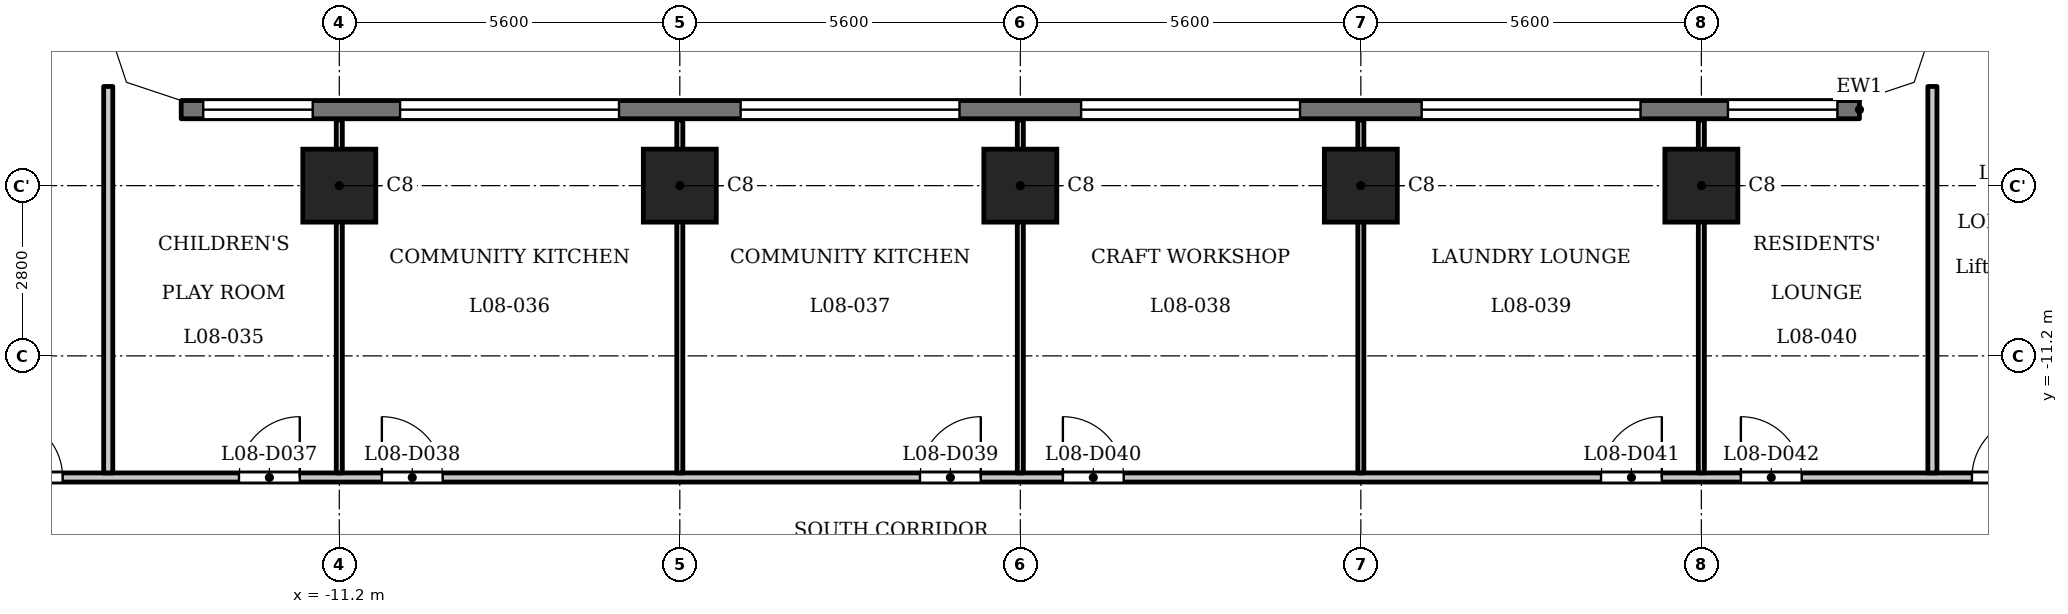
"""IFC4 building model, lengths in metres.
Left out: names, types, materials, properties, quantities, classifications, styles, units other than length and angle.
Written with IfcOpenShell. Run it as: python <this file> out.ifc"""

import sys

from ifc_helpers import new_model, si_unit, direction, frame, frame_2d, origin, origin_2d, place, context, subcontext, project, spatial, polyline, rectangle, outline, extrude, element, fill, save


model = new_model("IFC4")
c1 = context("Model", 3, precision=1e-05, world=origin(), true_north=direction((0.0, 1.0)))
c2 = subcontext(c1, "Body", "Model", "MODEL_VIEW")
j1 = project(units=[si_unit("LENGTHUNIT", "METRE"), si_unit("PLANEANGLEUNIT", "RADIAN")], contexts=[c1])
p1 = place(None, origin())
s1 = spatial("IfcSite", under=j1, at=p1, CompositionType="ELEMENT")
p2 = place(p1, origin())
s2 = spatial("IfcBuilding", under=s1, at=p2, CompositionType="ELEMENT")
p3 = place(p2, frame((0.0, 0.0, 37.5)))
s3 = spatial("IfcBuildingStorey", under=s2, at=p3, CompositionType="ELEMENT", Elevation=37.5)
for number, where, z_axis, x_axis in (
    (1, (-11.2, -8.4, 0.0), (0.0, 0.0, 1.0), (1.0, 0.0, 0.0)),
    (2, (-5.6, -8.4, 0.0), (0.0, 0.0, 1.0), (1.0, 0.0, 0.0)),
    (3, (0.0, -8.4, 0.0), (0.0, 0.0, 1.0), (1.0, 0.0, 0.0)),
    (4, (5.6, -8.4, 0.0), (0.0, 0.0, 1.0), (1.0, 0.0, 0.0)),
    (5, (11.2, -8.4, 0.0), (0.0, 0.0, 1.0), (1.0, 0.0, 0.0)),
):
    element("IfcColumn", number, at=place(p3, frame(where, z_axis=z_axis, x_axis=x_axis)), inside=s3, PredefinedType="COLUMN", context=c2, shape_type="SweptSolid", body=[
        extrude(rectangle(XDim=1.2, YDim=1.2, at=origin_2d()), origin(), (0.0, 0.0, 1.0), 3.5),
    ])
p4 = place(p3, frame((13.8, -7.15, 0.0), z_axis=(0.0, 0.0, 1.0), x_axis=(-1.0, 0.0, 0.0)))
e6 = element("IfcWall", 6, at=p4, inside=s3, PredefinedType="SOLIDWALL", context=c2, shape_type="SweptSolid", body=[
    extrude(rectangle(XDim=27.6, YDim=0.3, at=frame_2d((13.8, 0.0))), origin(), (0.0, 0.0, 1.0), 3.2),
])
p5 = place(p4, frame((0.363, 0.0, 0.9)))
e7 = element("IfcOpeningElement", 7, at=p5, cuts=e6, PredefinedType="OPENING", context=c2, shape_type="SweptSolid", body=[
    extrude(rectangle(XDim=1.8, YDim=1.25, at=frame_2d((0.9, 0.625))), frame((0.0, 0.16, 0.0), z_axis=(0.0, -1.0, 0.0), x_axis=(1.0, 0.0, 0.0)), (0.0, 0.0, 1.0), 0.32),
])
p6 = place(p4, frame((3.6, 0.0, 1.2)))
e8 = element("IfcOpeningElement", 8, at=p6, cuts=e6, PredefinedType="OPENING", context=c2, shape_type="SweptSolid", body=[
    extrude(rectangle(XDim=3.6, YDim=0.95, at=frame_2d((1.8, 0.475))), frame((0.0, 0.16, 0.0), z_axis=(0.0, -1.0, 0.0), x_axis=(1.0, 0.0, 0.0)), (0.0, 0.0, 1.0), 0.32),
])
p7 = place(p4, frame((9.2, 0.0, 1.2)))
e9 = element("IfcOpeningElement", 9, at=p7, cuts=e6, PredefinedType="OPENING", context=c2, shape_type="SweptSolid", body=[
    extrude(rectangle(XDim=3.6, YDim=0.95, at=frame_2d((1.8, 0.475))), frame((0.0, 0.16, 0.0), z_axis=(0.0, -1.0, 0.0), x_axis=(1.0, 0.0, 0.0)), (0.0, 0.0, 1.0), 0.32),
])
p8 = place(p4, frame((14.8, 0.0, 1.2)))
e10 = element("IfcOpeningElement", 10, at=p8, cuts=e6, PredefinedType="OPENING", context=c2, shape_type="SweptSolid", body=[
    extrude(rectangle(XDim=3.6, YDim=0.95, at=frame_2d((1.8, 0.475))), frame((0.0, 0.16, 0.0), z_axis=(0.0, -1.0, 0.0), x_axis=(1.0, 0.0, 0.0)), (0.0, 0.0, 1.0), 0.32),
])
p9 = place(p4, frame((20.4, 0.0, 1.2)))
e11 = element("IfcOpeningElement", 11, at=p9, cuts=e6, PredefinedType="OPENING", context=c2, shape_type="SweptSolid", body=[
    extrude(rectangle(XDim=3.6, YDim=0.95, at=frame_2d((1.8, 0.475))), frame((0.0, 0.16, 0.0), z_axis=(0.0, -1.0, 0.0), x_axis=(1.0, 0.0, 0.0)), (0.0, 0.0, 1.0), 0.32),
])
p10 = place(p4, frame((25.438, 0.0, 0.9)))
e12 = element("IfcOpeningElement", 12, at=p10, cuts=e6, PredefinedType="OPENING", context=c2, shape_type="SweptSolid", body=[
    extrude(rectangle(XDim=1.8, YDim=1.25, at=frame_2d((0.9, 0.625))), frame((0.0, 0.16, 0.0), z_axis=(0.0, -1.0, 0.0), x_axis=(1.0, 0.0, 0.0)), (0.0, 0.0, 1.0), 0.32),
])
p11 = place(p3, frame((-17.4, -13.2, 0.0), z_axis=(0.0, 0.0, 1.0), x_axis=(1.0, 0.0, 0.0)))
e13 = element("IfcWall", 13, at=p11, inside=s3, PredefinedType="PARTITIONING", context=c2, shape_type="SweptSolid", body=[
    extrude(rectangle(XDim=34.8, YDim=0.15, at=frame_2d((17.4, 0.0))), origin(), (0.0, 0.0, 1.0), 3.2),
])
p12 = place(p11, frame((0.65, 0.0, 0.0)))
e14 = element("IfcOpeningElement", 14, at=p12, cuts=e13, PredefinedType="OPENING", context=c2, shape_type="SweptSolid", body=[
    extrude(rectangle(XDim=1.0, YDim=2.1, at=frame_2d((0.5, 1.05))), frame((0.0, 0.085, 0.0), z_axis=(0.0, -1.0, 0.0), x_axis=(1.0, 0.0, 0.0)), (0.0, 0.0, 1.0), 0.17),
])
p13 = place(p11, frame((33.05, 0.0, 0.0)))
e15 = element("IfcOpeningElement", 15, at=p13, cuts=e13, PredefinedType="OPENING", context=c2, shape_type="SweptSolid", body=[
    extrude(rectangle(XDim=1.0, YDim=2.1, at=frame_2d((0.5, 1.05))), frame((0.0, 0.085, 0.0), z_axis=(0.0, -1.0, 0.0), x_axis=(1.0, 0.0, 0.0)), (0.0, 0.0, 1.0), 0.17),
])
p14 = place(p11, frame((4.55, 0.0, 0.0)))
e16 = element("IfcOpeningElement", 16, at=p14, cuts=e13, PredefinedType="OPENING", context=c2, shape_type="SweptSolid", body=[
    extrude(rectangle(XDim=1.0, YDim=2.1, at=frame_2d((0.5, 1.05))), frame((0.0, 0.085, 0.0), z_axis=(0.0, -1.0, 0.0), x_axis=(1.0, 0.0, 0.0)), (0.0, 0.0, 1.0), 0.17),
])
p15 = place(p11, frame((6.9, 0.0, 0.0)))
e17 = element("IfcOpeningElement", 17, at=p15, cuts=e13, PredefinedType="OPENING", context=c2, shape_type="SweptSolid", body=[
    extrude(rectangle(XDim=1.0, YDim=2.1, at=frame_2d((0.5, 1.05))), frame((0.0, 0.085, 0.0), z_axis=(0.0, -1.0, 0.0), x_axis=(1.0, 0.0, 0.0)), (0.0, 0.0, 1.0), 0.17),
])
p16 = place(p11, frame((15.75, 0.0, 0.0)))
e18 = element("IfcOpeningElement", 18, at=p16, cuts=e13, PredefinedType="OPENING", context=c2, shape_type="SweptSolid", body=[
    extrude(rectangle(XDim=1.0, YDim=2.1, at=frame_2d((0.5, 1.05))), frame((0.0, 0.085, 0.0), z_axis=(0.0, -1.0, 0.0), x_axis=(1.0, 0.0, 0.0)), (0.0, 0.0, 1.0), 0.17),
])
p17 = place(p11, frame((18.1, 0.0, 0.0)))
e19 = element("IfcOpeningElement", 19, at=p17, cuts=e13, PredefinedType="OPENING", context=c2, shape_type="SweptSolid", body=[
    extrude(rectangle(XDim=1.0, YDim=2.1, at=frame_2d((0.5, 1.05))), frame((0.0, 0.085, 0.0), z_axis=(0.0, -1.0, 0.0), x_axis=(1.0, 0.0, 0.0)), (0.0, 0.0, 1.0), 0.17),
])
p18 = place(p11, frame((26.95, 0.0, 0.0)))
e20 = element("IfcOpeningElement", 20, at=p18, cuts=e13, PredefinedType="OPENING", context=c2, shape_type="SweptSolid", body=[
    extrude(rectangle(XDim=1.0, YDim=2.1, at=frame_2d((0.5, 1.05))), frame((0.0, 0.085, 0.0), z_axis=(0.0, -1.0, 0.0), x_axis=(1.0, 0.0, 0.0)), (0.0, 0.0, 1.0), 0.17),
])
p19 = place(p11, frame((29.25, 0.0, 0.0)))
e21 = element("IfcOpeningElement", 21, at=p19, cuts=e13, PredefinedType="OPENING", context=c2, shape_type="SweptSolid", body=[
    extrude(rectangle(XDim=1.0, YDim=2.1, at=frame_2d((0.5, 1.05))), frame((0.0, 0.085, 0.0), z_axis=(0.0, -1.0, 0.0), x_axis=(1.0, 0.0, 0.0)), (0.0, 0.0, 1.0), 0.17),
])
p20 = place(p3, frame((-15.0, -13.125, 0.0), z_axis=(0.0, 0.0, 1.0), x_axis=(0.0, 1.0, 0.0)))
e22 = element("IfcWall", 22, at=p20, inside=s3, PredefinedType="PARTITIONING", context=c2, shape_type="SweptSolid", body=[
    extrude(rectangle(XDim=6.356, YDim=0.15, at=frame_2d((3.178, 0.0))), origin(), (0.0, 0.0, 1.0), 3.2),
])
for number, where, z_axis, x_axis in (
    (23, (-11.2, -13.125, 0.0), (0.0, 0.0, 1.0), (0.0, 1.0, 0.0)),
    (24, (-5.6, -13.125, 0.0), (0.0, 0.0, 1.0), (0.0, 1.0, 0.0)),
    (25, (0.0, -13.125, 0.0), (0.0, 0.0, 1.0), (0.0, 1.0, 0.0)),
    (26, (5.6, -13.125, 0.0), (0.0, 0.0, 1.0), (0.0, 1.0, 0.0)),
    (27, (11.2, -13.125, 0.0), (0.0, 0.0, 1.0), (0.0, 1.0, 0.0)),
):
    element("IfcWall", number, at=place(p3, frame(where, z_axis=z_axis, x_axis=x_axis)), inside=s3, PredefinedType="PARTITIONING", context=c2, shape_type="SweptSolid", body=[
        extrude(rectangle(XDim=5.805, YDim=0.1, at=frame_2d((2.902, 0.0))), origin(), (0.0, 0.0, 1.0), 3.2),
    ])
p21 = place(p3, frame((15.0, -13.125, 0.0), z_axis=(0.0, 0.0, 1.0), x_axis=(0.0, 1.0, 0.0)))
e28 = element("IfcWall", 28, at=p21, inside=s3, PredefinedType="PARTITIONING", context=c2, shape_type="SweptSolid", body=[
    extrude(rectangle(XDim=6.356, YDim=0.15, at=frame_2d((3.178, 0.0))), origin(), (0.0, 0.0, 1.0), 3.2),
])
p22 = place(p3, origin())
e29 = element("IfcWall", 29, at=p22, inside=s3, PredefinedType="SOLIDWALL", context=c2, shape_type="SweptSolid", body=[
    extrude(outline(polyline([(14.937, -6.937), (15.3, -5.849), (15.3, -5.8), (15.0, -5.8), (14.7, -6.7), (13.8, -7.0), (13.8, -7.3), (13.849, -7.3), (14.937, -6.937)])), origin(), (0.0, 0.0, 1.0), 3.2),
])
e30 = element("IfcWall", 30, at=p22, inside=s3, PredefinedType="SOLIDWALL", context=c2, shape_type="SweptSolid", body=[
    extrude(outline(polyline([(-14.937, -6.937), (-13.849, -7.3), (-13.8, -7.3), (-13.8, -7.0), (-14.7, -6.7), (-15.0, -5.8), (-15.3, -5.8), (-15.3, -5.849), (-14.937, -6.937)])), origin(), (0.0, 0.0, 1.0), 3.2),
])
p23 = place(p12, origin())
e31 = element("IfcDoor", 31, at=p23, inside=s3, OperationType="SINGLE_SWING_RIGHT", PredefinedType="DOOR", context=c2, shape_type="SweptSolid", body=[
    extrude(rectangle(XDim=1.0, YDim=2.1, at=frame_2d((0.5, 1.05))), frame((0.0, 0.025, 0.0), z_axis=(0.0, -1.0, 0.0), x_axis=(1.0, 0.0, 0.0)), (0.0, 0.0, 1.0), 0.05),
])
fill(e14, e31)
p24 = place(p13, origin())
e32 = element("IfcDoor", 32, at=p24, inside=s3, OperationType="SINGLE_SWING_LEFT", PredefinedType="DOOR", context=c2, shape_type="SweptSolid", body=[
    extrude(rectangle(XDim=1.0, YDim=2.1, at=frame_2d((0.5, 1.05))), frame((0.0, 0.025, 0.0), z_axis=(0.0, -1.0, 0.0), x_axis=(1.0, 0.0, 0.0)), (0.0, 0.0, 1.0), 0.05),
])
fill(e15, e32)
p25 = place(p14, origin())
e33 = element("IfcDoor", 33, at=p25, inside=s3, OperationType="SINGLE_SWING_LEFT", PredefinedType="DOOR", context=c2, shape_type="SweptSolid", body=[
    extrude(rectangle(XDim=1.0, YDim=2.1, at=frame_2d((0.5, 1.05))), frame((0.0, 0.025, 0.0), z_axis=(0.0, -1.0, 0.0), x_axis=(1.0, 0.0, 0.0)), (0.0, 0.0, 1.0), 0.05),
])
fill(e16, e33)
p26 = place(p15, origin())
e34 = element("IfcDoor", 34, at=p26, inside=s3, OperationType="SINGLE_SWING_RIGHT", PredefinedType="DOOR", context=c2, shape_type="SweptSolid", body=[
    extrude(rectangle(XDim=1.0, YDim=2.1, at=frame_2d((0.5, 1.05))), frame((0.0, 0.025, 0.0), z_axis=(0.0, -1.0, 0.0), x_axis=(1.0, 0.0, 0.0)), (0.0, 0.0, 1.0), 0.05),
])
fill(e17, e34)
p27 = place(p16, origin())
e35 = element("IfcDoor", 35, at=p27, inside=s3, OperationType="SINGLE_SWING_LEFT", PredefinedType="DOOR", context=c2, shape_type="SweptSolid", body=[
    extrude(rectangle(XDim=1.0, YDim=2.1, at=frame_2d((0.5, 1.05))), frame((0.0, 0.025, 0.0), z_axis=(0.0, -1.0, 0.0), x_axis=(1.0, 0.0, 0.0)), (0.0, 0.0, 1.0), 0.05),
])
fill(e18, e35)
p28 = place(p17, origin())
e36 = element("IfcDoor", 36, at=p28, inside=s3, OperationType="SINGLE_SWING_RIGHT", PredefinedType="DOOR", context=c2, shape_type="SweptSolid", body=[
    extrude(rectangle(XDim=1.0, YDim=2.1, at=frame_2d((0.5, 1.05))), frame((0.0, 0.025, 0.0), z_axis=(0.0, -1.0, 0.0), x_axis=(1.0, 0.0, 0.0)), (0.0, 0.0, 1.0), 0.05),
])
fill(e19, e36)
p29 = place(p18, origin())
e37 = element("IfcDoor", 37, at=p29, inside=s3, OperationType="SINGLE_SWING_LEFT", PredefinedType="DOOR", context=c2, shape_type="SweptSolid", body=[
    extrude(rectangle(XDim=1.0, YDim=2.1, at=frame_2d((0.5, 1.05))), frame((0.0, 0.025, 0.0), z_axis=(0.0, -1.0, 0.0), x_axis=(1.0, 0.0, 0.0)), (0.0, 0.0, 1.0), 0.05),
])
fill(e20, e37)
p30 = place(p19, origin())
e38 = element("IfcDoor", 38, at=p30, inside=s3, OperationType="SINGLE_SWING_RIGHT", PredefinedType="DOOR", context=c2, shape_type="SweptSolid", body=[
    extrude(rectangle(XDim=1.0, YDim=2.1, at=frame_2d((0.5, 1.05))), frame((0.0, 0.025, 0.0), z_axis=(0.0, -1.0, 0.0), x_axis=(1.0, 0.0, 0.0)), (0.0, 0.0, 1.0), 0.05),
])
fill(e21, e38)
p31 = place(p5, origin())
e39 = element("IfcWindow", 39, at=p31, inside=s3, PartitioningType="SINGLE_PANEL", PredefinedType="WINDOW", context=c2, shape_type="SweptSolid", body=[
    extrude(rectangle(XDim=1.8, YDim=1.25, at=frame_2d((0.9, 0.625))), frame((0.0, 0.03, 0.0), z_axis=(0.0, -1.0, 0.0), x_axis=(1.0, 0.0, 0.0)), (0.0, 0.0, 1.0), 0.06),
])
fill(e7, e39)
p32 = place(p6, origin())
e40 = element("IfcWindow", 40, at=p32, inside=s3, PartitioningType="SINGLE_PANEL", PredefinedType="WINDOW", context=c2, shape_type="SweptSolid", body=[
    extrude(rectangle(XDim=3.6, YDim=0.95, at=frame_2d((1.8, 0.475))), frame((0.0, 0.03, 0.0), z_axis=(0.0, -1.0, 0.0), x_axis=(1.0, 0.0, 0.0)), (0.0, 0.0, 1.0), 0.06),
])
fill(e8, e40)
p33 = place(p7, origin())
e41 = element("IfcWindow", 41, at=p33, inside=s3, PartitioningType="SINGLE_PANEL", PredefinedType="WINDOW", context=c2, shape_type="SweptSolid", body=[
    extrude(rectangle(XDim=3.6, YDim=0.95, at=frame_2d((1.8, 0.475))), frame((0.0, 0.03, 0.0), z_axis=(0.0, -1.0, 0.0), x_axis=(1.0, 0.0, 0.0)), (0.0, 0.0, 1.0), 0.06),
])
fill(e9, e41)
p34 = place(p8, origin())
e42 = element("IfcWindow", 42, at=p34, inside=s3, PartitioningType="SINGLE_PANEL", PredefinedType="WINDOW", context=c2, shape_type="SweptSolid", body=[
    extrude(rectangle(XDim=3.6, YDim=0.95, at=frame_2d((1.8, 0.475))), frame((0.0, 0.03, 0.0), z_axis=(0.0, -1.0, 0.0), x_axis=(1.0, 0.0, 0.0)), (0.0, 0.0, 1.0), 0.06),
])
fill(e10, e42)
p35 = place(p9, origin())
e43 = element("IfcWindow", 43, at=p35, inside=s3, PartitioningType="SINGLE_PANEL", PredefinedType="WINDOW", context=c2, shape_type="SweptSolid", body=[
    extrude(rectangle(XDim=3.6, YDim=0.95, at=frame_2d((1.8, 0.475))), frame((0.0, 0.03, 0.0), z_axis=(0.0, -1.0, 0.0), x_axis=(1.0, 0.0, 0.0)), (0.0, 0.0, 1.0), 0.06),
])
fill(e11, e43)
p36 = place(p10, origin())
e44 = element("IfcWindow", 44, at=p36, inside=s3, PartitioningType="SINGLE_PANEL", PredefinedType="WINDOW", context=c2, shape_type="SweptSolid", body=[
    extrude(rectangle(XDim=1.8, YDim=1.25, at=frame_2d((0.9, 0.625))), frame((0.0, 0.03, 0.0), z_axis=(0.0, -1.0, 0.0), x_axis=(1.0, 0.0, 0.0)), (0.0, 0.0, 1.0), 0.06),
])
fill(e12, e44)
save(model, sys.argv[1])
